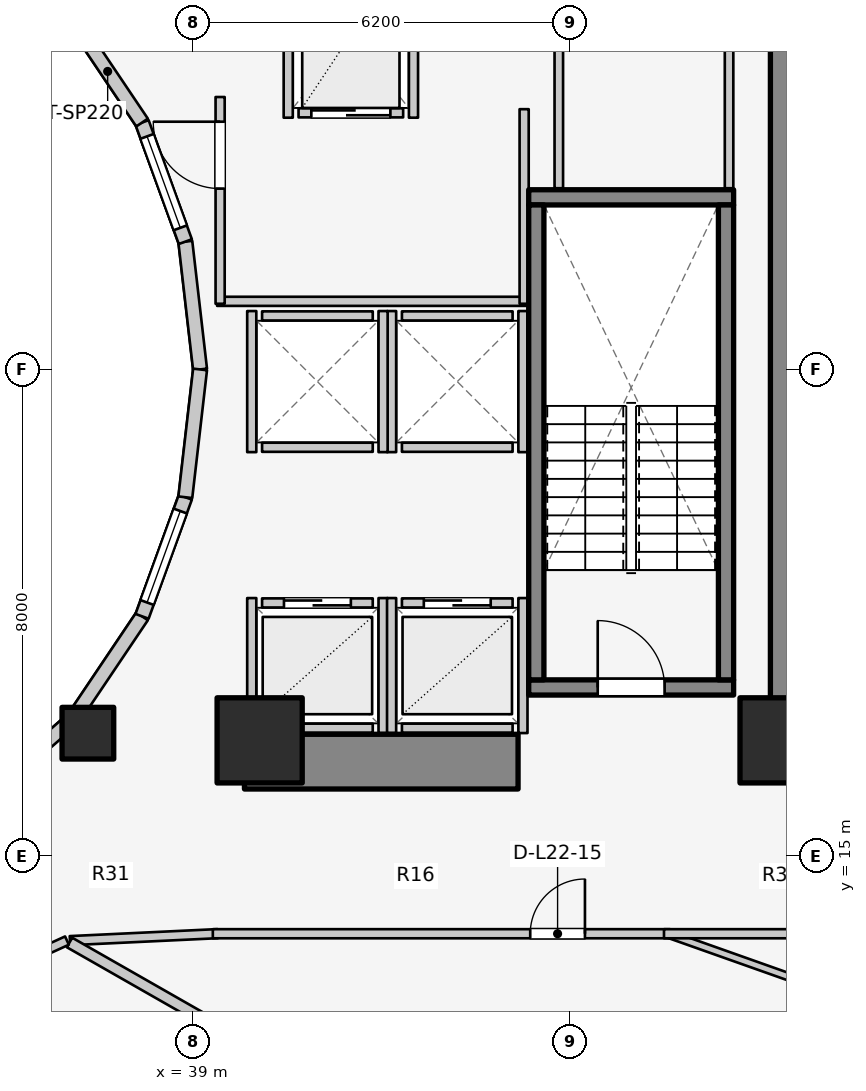
"""IFC4 building model, lengths in metres.
Left out: names, types, materials, properties, quantities, classifications, styles, units other than length and angle.
Written with IfcOpenShell. Run it as: python <this file> out.ifc"""

import sys

from ifc_helpers import new_model, si_unit, direction, frame, frame_2d, origin, origin_2d, place, context, subcontext, project, spatial, rectangle, extrude, element, fill, save


model = new_model("IFC4")
c1 = context("Model", 3, precision=1e-05, world=origin(), true_north=direction((0.0, 1.0)))
c2 = subcontext(c1, "Body", "Model", "MODEL_VIEW")
j1 = project(units=[si_unit("LENGTHUNIT", "METRE"), si_unit("PLANEANGLEUNIT", "RADIAN")], contexts=[c1])
p1 = place(None, origin())
s1 = spatial("IfcSite", under=j1, at=p1, CompositionType="ELEMENT")
p2 = place(p1, origin())
s2 = spatial("IfcBuilding", under=s1, at=p2, CompositionType="ELEMENT")
p3 = place(p2, frame((0.0, 0.0, 76.3)))
s3 = spatial("IfcBuildingStorey", under=s2, at=p3, CompositionType="ELEMENT", Elevation=76.3)
p4 = place(p3, frame((48.95, 17.05, 0.0), z_axis=(0.0, 0.0, 1.0), x_axis=(0.0, 1.0, 0.0)))
e1 = element("IfcWall", 1, at=p4, inside=s3, PredefinedType="SHEAR", context=c2, shape_type="SweptSolid", body=[
    extrude(rectangle(XDim=12.8, YDim=0.9, at=frame_2d((6.4, 0.0))), origin(), (0.0, 0.0, 1.0), 3.1),
])
p5 = place(p3, frame((39.85, 16.55, 0.0), z_axis=(0.0, 0.0, 1.0), x_axis=(1.0, 0.0, 0.0)))
e2 = element("IfcWall", 2, at=p5, inside=s3, PredefinedType="SHEAR", context=c2, shape_type="SweptSolid", body=[
    extrude(rectangle(XDim=4.5, YDim=0.9, at=frame_2d((2.25, 0.0))), origin(), (0.0, 0.0, 1.0), 3.1),
])
p6 = place(p3, frame((44.525, 17.77, 0.0), z_axis=(0.0, 0.0, 1.0), x_axis=(1.0, 0.0, 0.0)))
e3 = element("IfcWall", 3, at=p6, inside=s3, PredefinedType="SOLIDWALL", context=c2, shape_type="SweptSolid", body=[
    extrude(rectangle(XDim=3.37, YDim=0.25, at=frame_2d((1.685, 0.0))), origin(), (0.0, 0.0, 1.0), 3.1),
])
p7 = place(p6, frame((1.135, 0.0, 0.0)))
e4 = element("IfcOpeningElement", 4, at=p7, cuts=e3, PredefinedType="OPENING", context=c2, shape_type="SweptSolid", body=[
    extrude(rectangle(XDim=1.1, YDim=2.1, at=frame_2d((0.55, 1.05))), frame((0.0, 0.135, 0.0), z_axis=(0.0, -1.0, 0.0), x_axis=(1.0, 0.0, 0.0)), (0.0, 0.0, 1.0), 0.27),
])
p8 = place(p3, frame((44.525, 25.83, 0.0), z_axis=(0.0, 0.0, 1.0), x_axis=(1.0, 0.0, 0.0)))
e5 = element("IfcWall", 5, at=p8, inside=s3, PredefinedType="SOLIDWALL", context=c2, shape_type="SweptSolid", body=[
    extrude(rectangle(XDim=3.37, YDim=0.25, at=frame_2d((1.685, 0.0))), origin(), (0.0, 0.0, 1.0), 3.1),
])
for number, where, z_axis, x_axis in (
    (6, (44.65, 17.895, 0.0), (0.0, 0.0, 1.0), (0.0, 1.0, 0.0)),
    (7, (47.77, 17.895, 0.0), (0.0, 0.0, 1.0), (0.0, 1.0, 0.0)),
):
    element("IfcWall", number, at=place(p3, frame(where, z_axis=z_axis, x_axis=x_axis)), inside=s3, PredefinedType="SOLIDWALL", context=c2, shape_type="SweptSolid", body=[
        extrude(rectangle(XDim=7.81, YDim=0.25, at=frame_2d((3.905, 0.0))), origin(), (0.0, 0.0, 1.0), 3.1),
    ])
for number, where, z_axis, x_axis in (
    (8, (40.1, 16.9, 0.0), (0.0, 0.0, 1.0), (1.0, 0.0, 0.0)),
    (9, (48.7, 16.9, 0.0), (0.0, 0.0, 1.0), (1.0, 0.0, 0.0)),
):
    element("IfcColumn", number, at=place(p3, frame(where, z_axis=z_axis, x_axis=x_axis)), inside=s3, PredefinedType="COLUMN", context=c2, shape_type="SweptSolid", body=[
        extrude(rectangle(XDim=1.4, YDim=1.4, at=origin_2d()), origin(), (0.0, 0.0, 1.0), 3.1),
    ])
p9 = place(p3, frame((37.275, 17.018, 0.0), z_axis=(0.0, 0.0, 1.0), x_axis=(1.0, 0.0, 0.0)))
e10 = element("IfcColumn", 10, at=p9, inside=s3, PredefinedType="COLUMN", context=c2, shape_type="SweptSolid", body=[
    extrude(rectangle(XDim=0.85, YDim=0.85, at=origin_2d()), origin(), (0.0, 0.0, 1.0), 3.1),
])
p10 = place(p3, frame((39.12, 23.0, 0.0), z_axis=(0.0, 0.0, 1.0), x_axis=(-0.114711713601, 0.993398823617, 0.0)))
e11 = element("IfcWall", 11, at=p10, inside=s3, PredefinedType="STANDARD", context=c2, shape_type="SweptSolid", body=[
    extrude(rectangle(XDim=2.115, YDim=0.23, at=frame_2d((1.058, 0.0))), origin(), (0.0, 0.0, 1.0), 2.84),
])
p11 = place(p3, frame((38.877, 25.102, 0.0), z_axis=(0.0, 0.0, 1.0), x_axis=(-0.341423187295, 0.93990968033, 0.0)))
e12 = element("IfcWall", 12, at=p11, inside=s3, PredefinedType="STANDARD", context=c2, shape_type="SweptSolid", body=[
    extrude(rectangle(XDim=2.084, YDim=0.23, at=frame_2d((1.042, 0.0))), origin(), (0.0, 0.0, 1.0), 2.84),
])
p12 = place(p11, frame((0.242, 0.0, 0.85)))
e13 = element("IfcOpeningElement", 13, at=p12, cuts=e12, PredefinedType="OPENING", context=c2, shape_type="SweptSolid", body=[
    extrude(rectangle(XDim=1.6, YDim=1.65, at=frame_2d((0.8, 0.825))), frame((0.0, 0.125, 0.0), z_axis=(0.0, -1.0, 0.0), x_axis=(1.0, 0.0, 0.0)), (0.0, 0.0, 1.0), 0.25),
])
p13 = place(p3, frame((38.166, 27.06, 0.0), z_axis=(0.0, 0.0, 1.0), x_axis=(-0.558197800898, 0.829707909492, 0.0)))
e14 = element("IfcWall", 14, at=p13, inside=s3, PredefinedType="STANDARD", context=c2, shape_type="SweptSolid", body=[
    extrude(rectangle(XDim=2.027, YDim=0.23, at=frame_2d((1.013, 0.0))), origin(), (0.0, 0.0, 1.0), 2.16),
])
p14 = place(p3, frame((35.56, 15.968, 0.0), z_axis=(0.0, 0.0, 1.0), x_axis=(0.752576694707, 0.658504607869, 0.0)))
e15 = element("IfcWall", 15, at=p14, inside=s3, PredefinedType="STANDARD", context=c2, shape_type="SweptSolid", body=[
    extrude(rectangle(XDim=1.959, YDim=0.23, at=frame_2d((0.98, 0.0))), origin(), (0.0, 0.0, 1.0), 2.16),
])
p15 = place(p3, frame((37.035, 17.258, 0.0), z_axis=(0.0, 0.0, 1.0), x_axis=(0.558197800898, 0.829707909492, 0.0)))
e16 = element("IfcWall", 16, at=p15, inside=s3, PredefinedType="STANDARD", context=c2, shape_type="SweptSolid", body=[
    extrude(rectangle(XDim=2.027, YDim=0.23, at=frame_2d((1.013, 0.0))), origin(), (0.0, 0.0, 1.0), 2.16),
])
p16 = place(p3, frame((38.166, 18.94, 0.0), z_axis=(0.0, 0.0, 1.0), x_axis=(0.341423187295, 0.93990968033, 0.0)))
e17 = element("IfcWall", 17, at=p16, inside=s3, PredefinedType="STANDARD", context=c2, shape_type="SweptSolid", body=[
    extrude(rectangle(XDim=2.084, YDim=0.23, at=frame_2d((1.042, 0.0))), origin(), (0.0, 0.0, 1.0), 2.84),
])
p17 = place(p16, frame((0.242, 0.0, 0.85)))
e18 = element("IfcOpeningElement", 18, at=p17, cuts=e17, PredefinedType="OPENING", context=c2, shape_type="SweptSolid", body=[
    extrude(rectangle(XDim=1.6, YDim=1.65, at=frame_2d((0.8, 0.825))), frame((0.0, 0.125, 0.0), z_axis=(0.0, -1.0, 0.0), x_axis=(1.0, 0.0, 0.0)), (0.0, 0.0, 1.0), 0.25),
])
p18 = place(p3, frame((38.877, 20.898, 0.0), z_axis=(0.0, 0.0, 1.0), x_axis=(0.114711713601, 0.993398823617, 0.0)))
e19 = element("IfcWall", 19, at=p18, inside=s3, PredefinedType="STANDARD", context=c2, shape_type="SweptSolid", body=[
    extrude(rectangle(XDim=2.115, YDim=0.23, at=frame_2d((1.058, 0.0))), origin(), (0.0, 0.0, 1.0), 2.84),
])
p19 = place(p3, frame((40.14, 19.16, 0.0), z_axis=(0.0, 0.0, 1.0), x_axis=(1.0, 0.0, 0.0)))
e20 = element("IfcWall", 20, at=p19, inside=s3, PredefinedType="SOLIDWALL", context=c2, shape_type="SweptSolid", body=[
    extrude(rectangle(XDim=1.82, YDim=0.15, at=frame_2d((0.91, 0.0))), origin(), (0.0, 0.0, 1.0), 2.12),
])
p20 = place(p19, frame((0.36, 0.0, 0.0)))
e21 = element("IfcOpeningElement", 21, at=p20, cuts=e20, PredefinedType="OPENING", context=c2, shape_type="SweptSolid", body=[
    extrude(rectangle(XDim=1.1, YDim=2.1, at=frame_2d((0.55, 1.05))), frame((0.0, 0.085, 0.0), z_axis=(0.0, -1.0, 0.0), x_axis=(1.0, 0.0, 0.0)), (0.0, 0.0, 1.0), 0.17),
])
p21 = place(p3, frame((40.14, 17.1, 0.0), z_axis=(0.0, 0.0, 1.0), x_axis=(1.0, 0.0, 0.0)))
e22 = element("IfcWall", 22, at=p21, inside=s3, PredefinedType="SOLIDWALL", context=c2, shape_type="SweptSolid", body=[
    extrude(rectangle(XDim=1.82, YDim=0.15, at=frame_2d((0.91, 0.0))), origin(), (0.0, 0.0, 1.0), 2.12),
])
p22 = place(p3, frame((39.97, 17.02, 0.0), z_axis=(0.0, 0.0, 1.0), x_axis=(0.0, 1.0, 0.0)))
e23 = element("IfcWall", 23, at=p22, inside=s3, PredefinedType="SOLIDWALL", context=c2, shape_type="SweptSolid", body=[
    extrude(rectangle(XDim=2.22, YDim=0.15, at=frame_2d((1.11, 0.0))), origin(), (0.0, 0.0, 1.0), 2.12),
])
p23 = place(p3, frame((42.13, 17.02, 0.0), z_axis=(0.0, 0.0, 1.0), x_axis=(0.0, 1.0, 0.0)))
e24 = element("IfcWall", 24, at=p23, inside=s3, PredefinedType="SOLIDWALL", context=c2, shape_type="SweptSolid", body=[
    extrude(rectangle(XDim=2.22, YDim=0.15, at=frame_2d((1.11, 0.0))), origin(), (0.0, 0.0, 1.0), 2.855),
])
p24 = place(p3, frame((42.44, 19.16, 0.0), z_axis=(0.0, 0.0, 1.0), x_axis=(1.0, 0.0, 0.0)))
e25 = element("IfcWall", 25, at=p24, inside=s3, PredefinedType="SOLIDWALL", context=c2, shape_type="SweptSolid", body=[
    extrude(rectangle(XDim=1.82, YDim=0.15, at=frame_2d((0.91, 0.0))), origin(), (0.0, 0.0, 1.0), 2.855),
])
p25 = place(p24, frame((0.36, 0.0, 0.0)))
e26 = element("IfcOpeningElement", 26, at=p25, cuts=e25, PredefinedType="OPENING", context=c2, shape_type="SweptSolid", body=[
    extrude(rectangle(XDim=1.1, YDim=2.1, at=frame_2d((0.55, 1.05))), frame((0.0, 0.085, 0.0), z_axis=(0.0, -1.0, 0.0), x_axis=(1.0, 0.0, 0.0)), (0.0, 0.0, 1.0), 0.17),
])
p26 = place(p3, frame((42.44, 17.1, 0.0), z_axis=(0.0, 0.0, 1.0), x_axis=(1.0, 0.0, 0.0)))
e27 = element("IfcWall", 27, at=p26, inside=s3, PredefinedType="SOLIDWALL", context=c2, shape_type="SweptSolid", body=[
    extrude(rectangle(XDim=1.82, YDim=0.15, at=frame_2d((0.91, 0.0))), origin(), (0.0, 0.0, 1.0), 2.855),
])
p27 = place(p3, frame((42.27, 17.02, 0.0), z_axis=(0.0, 0.0, 1.0), x_axis=(0.0, 1.0, 0.0)))
e28 = element("IfcWall", 28, at=p27, inside=s3, PredefinedType="SOLIDWALL", context=c2, shape_type="SweptSolid", body=[
    extrude(rectangle(XDim=2.22, YDim=0.15, at=frame_2d((1.11, 0.0))), origin(), (0.0, 0.0, 1.0), 2.855),
])
p28 = place(p3, frame((44.43, 17.02, 0.0), z_axis=(0.0, 0.0, 1.0), x_axis=(0.0, 1.0, 0.0)))
e29 = element("IfcWall", 29, at=p28, inside=s3, PredefinedType="SOLIDWALL", context=c2, shape_type="SweptSolid", body=[
    extrude(rectangle(XDim=2.22, YDim=0.15, at=frame_2d((1.11, 0.0))), origin(), (0.0, 0.0, 1.0), 2.12),
])
for number, where, z_axis, x_axis in (
    (30, (42.44, 21.72, 0.0), (0.0, 0.0, 1.0), (1.0, 0.0, 0.0)),
    (31, (42.44, 23.88, 0.0), (0.0, 0.0, 1.0), (1.0, 0.0, 0.0)),
):
    element("IfcWall", number, at=place(p3, frame(where, z_axis=z_axis, x_axis=x_axis)), inside=s3, PredefinedType="SOLIDWALL", context=c2, shape_type="SweptSolid", body=[
        extrude(rectangle(XDim=1.82, YDim=0.15, at=frame_2d((0.91, 0.0))), origin(), (0.0, 0.0, 1.0), 2.855),
    ])
for number, where, z_axis, x_axis in (
    (32, (42.27, 21.64, 0.0), (0.0, 0.0, 1.0), (0.0, 1.0, 0.0)),
    (33, (44.43, 21.64, 0.0), (0.0, 0.0, 1.0), (0.0, 1.0, 0.0)),
):
    element("IfcWall", number, at=place(p3, frame(where, z_axis=z_axis, x_axis=x_axis)), inside=s3, PredefinedType="SOLIDWALL", context=c2, shape_type="SweptSolid", body=[
        extrude(rectangle(XDim=2.32, YDim=0.15, at=frame_2d((1.16, 0.0))), origin(), (0.0, 0.0, 1.0), 2.855),
    ])
for number, where, z_axis, x_axis in (
    (34, (40.14, 21.72, 0.0), (0.0, 0.0, 1.0), (1.0, 0.0, 0.0)),
    (35, (40.14, 23.88, 0.0), (0.0, 0.0, 1.0), (1.0, 0.0, 0.0)),
):
    element("IfcWall", number, at=place(p3, frame(where, z_axis=z_axis, x_axis=x_axis)), inside=s3, PredefinedType="SOLIDWALL", context=c2, shape_type="SweptSolid", body=[
        extrude(rectangle(XDim=1.82, YDim=0.15, at=frame_2d((0.91, 0.0))), origin(), (0.0, 0.0, 1.0), 2.12),
    ])
p29 = place(p3, frame((39.97, 21.64, 0.0), z_axis=(0.0, 0.0, 1.0), x_axis=(0.0, 1.0, 0.0)))
e36 = element("IfcWall", 36, at=p29, inside=s3, PredefinedType="SOLIDWALL", context=c2, shape_type="SweptSolid", body=[
    extrude(rectangle(XDim=2.32, YDim=0.15, at=frame_2d((1.16, 0.0))), origin(), (0.0, 0.0, 1.0), 2.12),
])
p30 = place(p3, frame((42.13, 21.64, 0.0), z_axis=(0.0, 0.0, 1.0), x_axis=(0.0, 1.0, 0.0)))
e37 = element("IfcWall", 37, at=p30, inside=s3, PredefinedType="SOLIDWALL", context=c2, shape_type="SweptSolid", body=[
    extrude(rectangle(XDim=2.32, YDim=0.15, at=frame_2d((1.16, 0.0))), origin(), (0.0, 0.0, 1.0), 2.855),
])
p31 = place(p3, frame((40.74, 27.22, 0.0), z_axis=(0.0, 0.0, 1.0), x_axis=(1.0, 0.0, 0.0)))
e38 = element("IfcWall", 38, at=p31, inside=s3, PredefinedType="SOLIDWALL", context=c2, shape_type="SweptSolid", body=[
    extrude(rectangle(XDim=1.72, YDim=0.15, at=frame_2d((0.86, 0.0))), origin(), (0.0, 0.0, 1.0), 2.855),
])
p32 = place(p31, frame((0.21, 0.0, 0.0)))
e39 = element("IfcOpeningElement", 39, at=p32, cuts=e38, PredefinedType="OPENING", context=c2, shape_type="SweptSolid", body=[
    extrude(rectangle(XDim=1.3, YDim=2.1, at=frame_2d((0.65, 1.05))), frame((0.0, 0.085, 0.0), z_axis=(0.0, -1.0, 0.0), x_axis=(1.0, 0.0, 0.0)), (0.0, 0.0, 1.0), 0.17),
])
for number, where, z_axis, x_axis in (
    (40, (40.57, 27.14, 0.0), (0.0, 0.0, 1.0), (0.0, 1.0, 0.0)),
    (41, (42.63, 27.14, 0.0), (0.0, 0.0, 1.0), (0.0, 1.0, 0.0)),
):
    element("IfcWall", number, at=place(p3, frame(where, z_axis=z_axis, x_axis=x_axis)), inside=s3, PredefinedType="SOLIDWALL", context=c2, shape_type="SweptSolid", body=[
        extrude(rectangle(XDim=2.72, YDim=0.15, at=frame_2d((1.36, 0.0))), origin(), (0.0, 0.0, 1.0), 2.855),
    ])
p33 = place(p3, frame((39.4, 24.12, 0.0), z_axis=(0.0, 0.0, 1.0), x_axis=(1.0, 0.0, 0.0)))
e42 = element("IfcWall", 42, at=p33, inside=s3, PredefinedType="PARTITIONING", context=c2, shape_type="SweptSolid", body=[
    extrude(rectangle(XDim=5.08, YDim=0.15, at=frame_2d((2.54, 0.0))), origin(), (0.0, 0.0, 1.0), 2.12),
])
p34 = place(p3, frame((44.45, 24.08, 0.0), z_axis=(0.0, 0.0, 1.0), x_axis=(0.0, 1.0, 0.0)))
e43 = element("IfcWall", 43, at=p34, inside=s3, PredefinedType="PARTITIONING", context=c2, shape_type="SweptSolid", body=[
    extrude(rectangle(XDim=3.2, YDim=0.15, at=frame_2d((1.6, 0.0))), origin(), (0.0, 0.0, 1.0), 2.855),
])
p35 = place(p3, frame((39.45, 24.08, 0.0), z_axis=(0.0, 0.0, 1.0), x_axis=(0.0, 1.0, 0.0)))
e44 = element("IfcWall", 44, at=p35, inside=s3, PredefinedType="PARTITIONING", context=c2, shape_type="SweptSolid", body=[
    extrude(rectangle(XDim=3.4, YDim=0.15, at=frame_2d((1.7, 0.0))), origin(), (0.0, 0.0, 1.0), 2.855),
])
p36 = place(p35, frame((1.894, 0.0, 0.0)))
e45 = element("IfcOpeningElement", 45, at=p36, cuts=e44, PredefinedType="OPENING", context=c2, shape_type="SweptSolid", body=[
    extrude(rectangle(XDim=1.1, YDim=2.1, at=frame_2d((0.55, 1.05))), frame((0.0, 0.085, 0.0), z_axis=(0.0, -1.0, 0.0), x_axis=(1.0, 0.0, 0.0)), (0.0, 0.0, 1.0), 0.17),
])
for number, where, z_axis, x_axis in (
    (46, (45.02, 25.98, 0.0), (0.0, 0.0, 1.0), (0.0, 1.0, 0.0)),
    (47, (47.82, 25.98, 0.0), (0.0, 0.0, 1.0), (0.0, 1.0, 0.0)),
):
    element("IfcWall", number, at=place(p3, frame(where, z_axis=z_axis, x_axis=x_axis)), inside=s3, PredefinedType="PLUMBINGWALL", context=c2, shape_type="SweptSolid", body=[
        extrude(rectangle(XDim=3.88, YDim=0.14, at=frame_2d((1.94, 0.0))), origin(), (0.0, 0.0, 1.0), 2.855),
    ])
p37 = place(p3, frame((46.753, 13.737, 0.0), z_axis=(0.0, 0.0, 1.0), x_axis=(0.942633057048, -0.333830675284, 0.0)))
e48 = element("IfcWall", 48, at=p37, inside=s3, PredefinedType="MOVABLE", context=c2, shape_type="SweptSolid", body=[
    extrude(rectangle(XDim=4.94, YDim=0.12, at=frame_2d((2.47, 0.0))), origin(), (0.0, 0.0, 1.0), 2.142),
])
p38 = place(p37, frame((2.92, 0.0, 0.0)))
e49 = element("IfcOpeningElement", 49, at=p38, cuts=e48, PredefinedType="OPENING", context=c2, shape_type="SweptSolid", body=[
    extrude(rectangle(XDim=0.85, YDim=2.05, at=frame_2d((0.425, 1.025))), frame((0.0, 0.07, 0.0), z_axis=(0.0, -1.0, 0.0), x_axis=(1.0, 0.0, 0.0)), (0.0, 0.0, 1.0), 0.14),
])
p39 = place(p3, frame((36.98, 13.606, 0.0), z_axis=(0.0, 0.0, 1.0), x_axis=(0.998877427952, 0.047369651964, 0.0)))
e50 = element("IfcWall", 50, at=p39, inside=s3, PredefinedType="PARTITIONING", context=c2, shape_type="SweptSolid", body=[
    extrude(rectangle(XDim=2.433, YDim=0.15, at=frame_2d((1.216, 0.0))), origin(), (0.0, 0.0, 1.0), 2.272),
])
p40 = place(p3, frame((39.33, 13.72, 0.0), z_axis=(0.0, 0.0, 1.0), x_axis=(1.0, 0.0, 0.0)))
e51 = element("IfcWall", 51, at=p40, inside=s3, PredefinedType="PARTITIONING", context=c2, shape_type="SweptSolid", body=[
    extrude(rectangle(XDim=7.52, YDim=0.15, at=frame_2d((3.76, 0.0))), origin(), (0.0, 0.0, 1.0), 2.272),
])
p41 = place(p40, frame((5.22, 0.0, 0.0)))
e52 = element("IfcOpeningElement", 52, at=p41, cuts=e51, PredefinedType="OPENING", context=c2, shape_type="SweptSolid", body=[
    extrude(rectangle(XDim=0.9, YDim=2.1, at=frame_2d((0.45, 1.05))), frame((0.0, 0.085, 0.0), z_axis=(0.0, -1.0, 0.0), x_axis=(1.0, 0.0, 0.0)), (0.0, 0.0, 1.0), 0.17),
])
p42 = place(p3, frame((46.75, 13.72, 0.0), z_axis=(0.0, 0.0, 1.0), x_axis=(1.0, 0.0, 0.0)))
e53 = element("IfcWall", 53, at=p42, inside=s3, PredefinedType="PARTITIONING", context=c2, shape_type="SweptSolid", body=[
    extrude(rectangle(XDim=5.05, YDim=0.15, at=frame_2d((2.525, 0.0))), origin(), (0.0, 0.0, 1.0), 2.142),
])
p43 = place(p3, frame((36.973, 13.576, 0.0), z_axis=(0.0, 0.0, 1.0), x_axis=(0.868484076301, -0.495717065685, 0.0)))
e54 = element("IfcWall", 54, at=p43, inside=s3, PredefinedType="PARTITIONING", context=c2, shape_type="SweptSolid", body=[
    extrude(rectangle(XDim=8.789, YDim=0.18, at=frame_2d((4.394, 0.0))), origin(), (0.0, 0.0, 1.0), 2.272),
])
p44 = place(p3, frame((34.543, 12.518, 0.0), z_axis=(0.0, 0.0, 1.0), x_axis=(0.909747571199, 0.415161843982, 0.0)))
e55 = element("IfcWall", 55, at=p44, inside=s3, PredefinedType="PARTITIONING", context=c2, shape_type="SweptSolid", body=[
    extrude(rectangle(XDim=2.625, YDim=0.15, at=frame_2d((1.312, 0.0))), origin(), (0.0, 0.0, 1.0), 2.272),
])
p45 = place(p44, frame((0.838, 0.0, 0.0)))
e56 = element("IfcOpeningElement", 56, at=p45, cuts=e55, PredefinedType="OPENING", context=c2, shape_type="SweptSolid", body=[
    extrude(rectangle(XDim=0.95, YDim=2.1, at=frame_2d((0.475, 1.05))), frame((0.0, 0.085, 0.0), z_axis=(0.0, -1.0, 0.0), x_axis=(1.0, 0.0, 0.0)), (0.0, 0.0, 1.0), 0.17),
])
p46 = place(p12, origin())
e57 = element("IfcWindow", 57, at=p46, inside=s3, PartitioningType="SINGLE_PANEL", PredefinedType="WINDOW", context=c2, shape_type="SweptSolid", body=[
    extrude(rectangle(XDim=1.6, YDim=1.65, at=frame_2d((0.8, 0.825))), frame((0.0, 0.03, 0.0), z_axis=(0.0, -1.0, 0.0), x_axis=(1.0, 0.0, 0.0)), (0.0, 0.0, 1.0), 0.06),
])
fill(e13, e57)
p47 = place(p17, origin())
e58 = element("IfcWindow", 58, at=p47, inside=s3, PartitioningType="SINGLE_PANEL", PredefinedType="WINDOW", context=c2, shape_type="SweptSolid", body=[
    extrude(rectangle(XDim=1.6, YDim=1.65, at=frame_2d((0.8, 0.825))), frame((0.0, 0.03, 0.0), z_axis=(0.0, -1.0, 0.0), x_axis=(1.0, 0.0, 0.0)), (0.0, 0.0, 1.0), 0.06),
])
fill(e18, e58)
p48 = place(p7, origin())
e59 = element("IfcDoor", 59, at=p48, inside=s3, OperationType="SINGLE_SWING_LEFT", PredefinedType="DOOR", context=c2, shape_type="SweptSolid", body=[
    extrude(rectangle(XDim=1.1, YDim=2.1, at=frame_2d((0.55, 1.05))), frame((0.0, 0.025, 0.0), z_axis=(0.0, -1.0, 0.0), x_axis=(1.0, 0.0, 0.0)), (0.0, 0.0, 1.0), 0.05),
])
fill(e4, e59)
p49 = place(p20, origin())
e60 = element("IfcDoor", 60, at=p49, inside=s3, OperationType="DOUBLE_DOOR_SLIDING", PredefinedType="DOOR", context=c2, shape_type="SweptSolid", body=[
    extrude(rectangle(XDim=1.1, YDim=2.1, at=frame_2d((0.55, 1.05))), frame((0.0, 0.025, 0.0), z_axis=(0.0, -1.0, 0.0), x_axis=(1.0, 0.0, 0.0)), (0.0, 0.0, 1.0), 0.05),
])
fill(e21, e60)
p50 = place(p25, origin())
e61 = element("IfcDoor", 61, at=p50, inside=s3, OperationType="DOUBLE_DOOR_SLIDING", PredefinedType="DOOR", context=c2, shape_type="SweptSolid", body=[
    extrude(rectangle(XDim=1.1, YDim=2.1, at=frame_2d((0.55, 1.05))), frame((0.0, 0.025, 0.0), z_axis=(0.0, -1.0, 0.0), x_axis=(1.0, 0.0, 0.0)), (0.0, 0.0, 1.0), 0.05),
])
fill(e26, e61)
p51 = place(p32, origin())
e62 = element("IfcDoor", 62, at=p51, inside=s3, OperationType="DOUBLE_DOOR_SLIDING", PredefinedType="DOOR", context=c2, shape_type="SweptSolid", body=[
    extrude(rectangle(XDim=1.3, YDim=2.1, at=frame_2d((0.65, 1.05))), frame((0.0, 0.025, 0.0), z_axis=(0.0, -1.0, 0.0), x_axis=(1.0, 0.0, 0.0)), (0.0, 0.0, 1.0), 0.05),
])
fill(e39, e62)
p52 = place(p36, origin())
e63 = element("IfcDoor", 63, at=p52, inside=s3, OperationType="SINGLE_SWING_RIGHT", PredefinedType="DOOR", context=c2, shape_type="SweptSolid", body=[
    extrude(rectangle(XDim=1.1, YDim=2.1, at=frame_2d((0.55, 1.05))), frame((0.0, 0.025, 0.0), z_axis=(0.0, -1.0, 0.0), x_axis=(1.0, 0.0, 0.0)), (0.0, 0.0, 1.0), 0.05),
])
fill(e45, e63)
p53 = place(p41, origin())
e64 = element("IfcDoor", 64, at=p53, inside=s3, OperationType="SINGLE_SWING_RIGHT", PredefinedType="DOOR", context=c2, shape_type="SweptSolid", body=[
    extrude(rectangle(XDim=0.9, YDim=2.1, at=frame_2d((0.45, 1.05))), frame((0.0, 0.025, 0.0), z_axis=(0.0, -1.0, 0.0), x_axis=(1.0, 0.0, 0.0)), (0.0, 0.0, 1.0), 0.05),
])
fill(e52, e64)
save(model, sys.argv[1])
